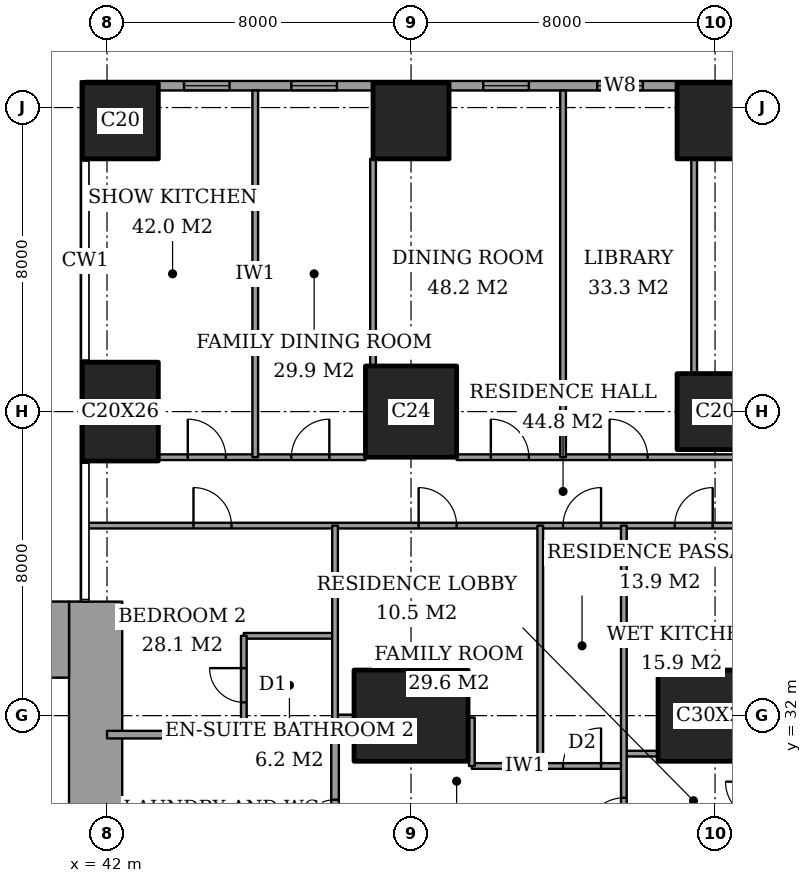
"""IFC4 building model, lengths in metres.
Left out: names, types, materials, properties, quantities, classifications, styles, units other than length and angle.
Written with IfcOpenShell. Run it as: python <this file> out.ifc"""

import sys

from ifc_helpers import new_model, si_unit, direction, frame, frame_2d, origin, origin_2d, place, context, subcontext, project, spatial, rectangle, extrude, element, fill, save


model = new_model("IFC4")
c1 = context("Model", 3, precision=1e-05, world=origin(), true_north=direction((0.0, 1.0)))
c2 = subcontext(c1, "Body", "Model", "MODEL_VIEW")
j1 = project(units=[si_unit("LENGTHUNIT", "METRE"), si_unit("PLANEANGLEUNIT", "RADIAN")], contexts=[c1])
p1 = place(None, origin())
s1 = spatial("IfcSite", under=j1, at=p1, CompositionType="ELEMENT")
p2 = place(p1, origin())
s2 = spatial("IfcBuilding", under=s1, at=p2, CompositionType="ELEMENT")
p3 = place(p2, frame((0.0, 0.0, 54.8)))
s3 = spatial("IfcBuildingStorey", under=s2, at=p3, CompositionType="ELEMENT", Elevation=54.8)
p4 = place(p3, frame((42.35, 40.0, 0.0), z_axis=(0.0, 0.0, 1.0), x_axis=(1.0, 0.0, 0.0)))
e1 = element("IfcColumn", 1, at=p4, inside=s3, PredefinedType="COLUMN", context=c2, shape_type="SweptSolid", body=[
    extrude(rectangle(XDim=2.0, YDim=2.6, at=origin_2d()), origin(), (0.0, 0.0, 1.0), 3.6),
])
p5 = place(p3, frame((42.35, 47.65, 0.0), z_axis=(0.0, 0.0, 1.0), x_axis=(1.0, 0.0, 0.0)))
e2 = element("IfcColumn", 2, at=p5, inside=s3, PredefinedType="COLUMN", context=c2, shape_type="SweptSolid", body=[
    extrude(rectangle(XDim=2.0, YDim=2.0, at=origin_2d()), origin(), (0.0, 0.0, 1.0), 3.6),
])
p6 = place(p3, frame((50.0, 32.0, 0.0), z_axis=(0.0, 0.0, 1.0), x_axis=(1.0, 0.0, 0.0)))
e3 = element("IfcColumn", 3, at=p6, inside=s3, PredefinedType="COLUMN", context=c2, shape_type="SweptSolid", body=[
    extrude(rectangle(XDim=3.0, YDim=2.4, at=origin_2d()), origin(), (0.0, 0.0, 1.0), 3.6),
])
p7 = place(p3, frame((50.0, 40.0, 0.0), z_axis=(0.0, 0.0, 1.0), x_axis=(1.0, 0.0, 0.0)))
e4 = element("IfcColumn", 4, at=p7, inside=s3, PredefinedType="COLUMN", context=c2, shape_type="SweptSolid", body=[
    extrude(rectangle(XDim=2.4, YDim=2.4, at=origin_2d()), origin(), (0.0, 0.0, 1.0), 3.6),
])
p8 = place(p3, frame((50.0, 47.65, 0.0), z_axis=(0.0, 0.0, 1.0), x_axis=(1.0, 0.0, 0.0)))
e5 = element("IfcColumn", 5, at=p8, inside=s3, PredefinedType="COLUMN", context=c2, shape_type="SweptSolid", body=[
    extrude(rectangle(XDim=2.0, YDim=2.0, at=origin_2d()), origin(), (0.0, 0.0, 1.0), 3.6),
])
p9 = place(p3, frame((58.0, 32.0, 0.0), z_axis=(0.0, 0.0, 1.0), x_axis=(1.0, 0.0, 0.0)))
e6 = element("IfcColumn", 6, at=p9, inside=s3, PredefinedType="COLUMN", context=c2, shape_type="SweptSolid", body=[
    extrude(rectangle(XDim=3.0, YDim=2.4, at=origin_2d()), origin(), (0.0, 0.0, 1.0), 3.6),
])
for number, where, z_axis, x_axis in (
    (7, (58.0, 40.0, 0.0), (0.0, 0.0, 1.0), (1.0, 0.0, 0.0)),
    (8, (58.0, 47.65, 0.0), (0.0, 0.0, 1.0), (1.0, 0.0, 0.0)),
):
    element("IfcColumn", number, at=place(p3, frame(where, z_axis=z_axis, x_axis=x_axis)), inside=s3, PredefinedType="COLUMN", context=c2, shape_type="SweptSolid", body=[
        extrude(rectangle(XDim=2.0, YDim=2.0, at=origin_2d()), origin(), (0.0, 0.0, 1.0), 3.6),
    ])
p10 = place(p3, frame((37.85, 34.0, 0.0), z_axis=(0.0, 0.0, 1.0), x_axis=(1.0, 0.0, 0.0)))
e9 = element("IfcWall", 9, at=p10, inside=s3, PredefinedType="SHEAR", context=c2, shape_type="SweptSolid", body=[
    extrude(rectangle(XDim=3.15, YDim=2.0, at=frame_2d((1.575, 0.0))), origin(), (0.0, 0.0, 1.0), 3.6),
])
p11 = place(p3, frame((41.7, 24.85, 0.0), z_axis=(0.0, 0.0, 1.0), x_axis=(0.0, 1.0, 0.0)))
e10 = element("IfcWall", 10, at=p11, inside=s3, PredefinedType="SHEAR", context=c2, shape_type="SweptSolid", body=[
    extrude(rectangle(XDim=10.15, YDim=1.4, at=frame_2d((5.075, 0.0))), origin(), (0.0, 0.0, 1.0), 3.6),
])
p12 = place(p3, frame((62.825, 48.575, 0.0), z_axis=(0.0, 0.0, 1.0), x_axis=(-1.0, 0.0, 0.0)))
e11 = element("IfcWall", 11, at=p12, inside=s3, PredefinedType="SOLIDWALL", context=c2, shape_type="SweptSolid", body=[
    extrude(rectangle(XDim=21.4, YDim=0.25, at=frame_2d((10.7, 0.0))), origin(), (0.0, 0.0, 1.0), 3.6),
])
p13 = place(p12, frame((0.775, 0.0, 0.6)))
e12 = element("IfcOpeningElement", 12, at=p13, cuts=e11, PredefinedType="OPENING", context=c2, shape_type="SweptSolid", body=[
    extrude(rectangle(XDim=2.4, YDim=2.0, at=frame_2d((1.2, 1.0))), frame((0.0, 0.135, 0.0), z_axis=(0.0, -1.0, 0.0), x_axis=(1.0, 0.0, 0.0)), (0.0, 0.0, 1.0), 0.27),
])
p14 = place(p12, frame((6.725, 0.0, 0.6)))
e13 = element("IfcOpeningElement", 13, at=p14, cuts=e11, PredefinedType="OPENING", context=c2, shape_type="SweptSolid", body=[
    extrude(rectangle(XDim=1.2, YDim=2.0, at=frame_2d((0.6, 1.0))), frame((0.0, 0.135, 0.0), z_axis=(0.0, -1.0, 0.0), x_axis=(1.0, 0.0, 0.0)), (0.0, 0.0, 1.0), 0.27),
])
p15 = place(p12, frame((9.725, 0.0, 0.6)))
e14 = element("IfcOpeningElement", 14, at=p15, cuts=e11, PredefinedType="OPENING", context=c2, shape_type="SweptSolid", body=[
    extrude(rectangle(XDim=1.2, YDim=2.0, at=frame_2d((0.6, 1.0))), frame((0.0, 0.135, 0.0), z_axis=(0.0, -1.0, 0.0), x_axis=(1.0, 0.0, 0.0)), (0.0, 0.0, 1.0), 0.27),
])
p16 = place(p12, frame((14.775, 0.0, 0.6)))
e15 = element("IfcOpeningElement", 15, at=p16, cuts=e11, PredefinedType="OPENING", context=c2, shape_type="SweptSolid", body=[
    extrude(rectangle(XDim=1.2, YDim=2.0, at=frame_2d((0.6, 1.0))), frame((0.0, 0.135, 0.0), z_axis=(0.0, -1.0, 0.0), x_axis=(1.0, 0.0, 0.0)), (0.0, 0.0, 1.0), 0.27),
])
p17 = place(p12, frame((17.6, 0.0, 0.6)))
e16 = element("IfcOpeningElement", 16, at=p17, cuts=e11, PredefinedType="OPENING", context=c2, shape_type="SweptSolid", body=[
    extrude(rectangle(XDim=1.2, YDim=2.0, at=frame_2d((0.6, 1.0))), frame((0.0, 0.135, 0.0), z_axis=(0.0, -1.0, 0.0), x_axis=(1.0, 0.0, 0.0)), (0.0, 0.0, 1.0), 0.27),
])
p18 = place(p3, frame((51.6, 30.675, 0.0), z_axis=(0.0, 0.0, 1.0), x_axis=(1.0, 0.0, 0.0)))
e17 = element("IfcWall", 17, at=p18, inside=s3, PredefinedType="PARTITIONING", context=c2, shape_type="SweptSolid", body=[
    extrude(rectangle(XDim=4.0, YDim=0.15, at=frame_2d((2.0, 0.0))), origin(), (0.0, 0.0, 1.0), 3.35),
])
p19 = place(p18, frame((2.4, 0.0, 0.0)))
e18 = element("IfcOpeningElement", 18, at=p19, cuts=e17, PredefinedType="OPENING", context=c2, shape_type="SweptSolid", body=[
    extrude(rectangle(XDim=1.0, YDim=2.1, at=frame_2d((0.5, 1.05))), frame((0.0, 0.085, 0.0), z_axis=(0.0, -1.0, 0.0), x_axis=(1.0, 0.0, 0.0)), (0.0, 0.0, 1.0), 0.17),
])
p20 = place(p3, frame((55.6, 31.0, 0.0), z_axis=(0.0, 0.0, 1.0), x_axis=(1.0, 0.0, 0.0)))
e19 = element("IfcWall", 19, at=p20, inside=s3, PredefinedType="PARTITIONING", context=c2, shape_type="SweptSolid", body=[
    extrude(rectangle(XDim=0.9, YDim=0.15, at=frame_2d((0.45, 0.0))), origin(), (0.0, 0.0, 1.0), 3.35),
])
p21 = place(p3, frame((42.0, 31.5, 0.0), z_axis=(0.0, 0.0, 1.0), x_axis=(1.0, 0.0, 0.0)))
e20 = element("IfcWall", 20, at=p21, inside=s3, PredefinedType="PARTITIONING", context=c2, shape_type="SweptSolid", body=[
    extrude(rectangle(XDim=6.0, YDim=0.2, at=frame_2d((3.0, 0.0))), origin(), (0.0, 0.0, 1.0), 3.35),
])
p22 = place(p3, frame((48.0, 31.95, 0.0), z_axis=(0.0, 0.0, 1.0), x_axis=(1.0, 0.0, 0.0)))
e21 = element("IfcWall", 21, at=p22, inside=s3, PredefinedType="PARTITIONING", context=c2, shape_type="SweptSolid", body=[
    extrude(rectangle(XDim=0.5, YDim=0.15, at=frame_2d((0.25, 0.0))), origin(), (0.0, 0.0, 1.0), 2.634),
])
p23 = place(p3, frame((45.6, 34.1, 0.0), z_axis=(0.0, 0.0, 1.0), x_axis=(1.0, 0.0, 0.0)))
e22 = element("IfcWall", 22, at=p23, inside=s3, PredefinedType="PARTITIONING", context=c2, shape_type="SweptSolid", body=[
    extrude(rectangle(XDim=2.4, YDim=0.15, at=frame_2d((1.2, 0.0))), origin(), (0.0, 0.0, 1.0), 3.35),
])
p24 = place(p3, frame((41.439, 37.0, 0.0), z_axis=(0.0, 0.0, 1.0), x_axis=(1.0, 0.0, 0.0)))
e23 = element("IfcWall", 23, at=p24, inside=s3, PredefinedType="PARTITIONING", context=c2, shape_type="SweptSolid", body=[
    extrude(rectangle(XDim=25.011, YDim=0.15, at=frame_2d((12.505, 0.0))), origin(), (0.0, 0.0, 1.0), 3.35),
])
p25 = place(p24, frame((12.561, 0.0, 0.0)))
e24 = element("IfcOpeningElement", 24, at=p25, cuts=e23, PredefinedType="OPENING", context=c2, shape_type="SweptSolid", body=[
    extrude(rectangle(XDim=1.0, YDim=2.1, at=frame_2d((0.5, 1.05))), frame((0.0, 0.085, 0.0), z_axis=(0.0, -1.0, 0.0), x_axis=(1.0, 0.0, 0.0)), (0.0, 0.0, 1.0), 0.17),
])
p26 = place(p24, frame((20.924, 0.0, 0.0)))
e25 = element("IfcOpeningElement", 25, at=p26, cuts=e23, PredefinedType="OPENING", context=c2, shape_type="SweptSolid", body=[
    extrude(rectangle(XDim=1.0, YDim=2.1, at=frame_2d((0.5, 1.05))), frame((0.0, 0.085, 0.0), z_axis=(0.0, -1.0, 0.0), x_axis=(1.0, 0.0, 0.0)), (0.0, 0.0, 1.0), 0.17),
])
p27 = place(p24, frame((15.499, 0.0, 0.0)))
e26 = element("IfcOpeningElement", 26, at=p27, cuts=e23, PredefinedType="OPENING", context=c2, shape_type="SweptSolid", body=[
    extrude(rectangle(XDim=1.0, YDim=2.1, at=frame_2d((0.5, 1.05))), frame((0.0, 0.085, 0.0), z_axis=(0.0, -1.0, 0.0), x_axis=(1.0, 0.0, 0.0)), (0.0, 0.0, 1.0), 0.17),
])
p28 = place(p24, frame((8.761, 0.0, 0.0)))
e27 = element("IfcOpeningElement", 27, at=p28, cuts=e23, PredefinedType="OPENING", context=c2, shape_type="SweptSolid", body=[
    extrude(rectangle(XDim=1.0, YDim=2.1, at=frame_2d((0.5, 1.05))), frame((0.0, 0.085, 0.0), z_axis=(0.0, -1.0, 0.0), x_axis=(1.0, 0.0, 0.0)), (0.0, 0.0, 1.0), 0.17),
])
p29 = place(p24, frame((2.836, 0.0, 0.0)))
e28 = element("IfcOpeningElement", 28, at=p29, cuts=e23, PredefinedType="OPENING", context=c2, shape_type="SweptSolid", body=[
    extrude(rectangle(XDim=1.0, YDim=2.1, at=frame_2d((0.5, 1.05))), frame((0.0, 0.085, 0.0), z_axis=(0.0, -1.0, 0.0), x_axis=(1.0, 0.0, 0.0)), (0.0, 0.0, 1.0), 0.17),
])
p30 = place(p3, frame((43.35, 38.8, 0.0), z_axis=(0.0, 0.0, 1.0), x_axis=(1.0, 0.0, 0.0)))
e29 = element("IfcWall", 29, at=p30, inside=s3, PredefinedType="PARTITIONING", context=c2, shape_type="SweptSolid", body=[
    extrude(rectangle(XDim=5.45, YDim=0.15, at=frame_2d((2.725, 0.0))), origin(), (0.0, 0.0, 1.0), 3.35),
])
p31 = place(p30, frame((3.5, 0.0, 0.0)))
e30 = element("IfcOpeningElement", 30, at=p31, cuts=e29, PredefinedType="OPENING", context=c2, shape_type="SweptSolid", body=[
    extrude(rectangle(XDim=1.0, YDim=2.1, at=frame_2d((0.5, 1.05))), frame((0.0, 0.085, 0.0), z_axis=(0.0, -1.0, 0.0), x_axis=(1.0, 0.0, 0.0)), (0.0, 0.0, 1.0), 0.17),
])
p32 = place(p30, frame((0.775, 0.0, 0.0)))
e31 = element("IfcOpeningElement", 31, at=p32, cuts=e29, PredefinedType="OPENING", context=c2, shape_type="SweptSolid", body=[
    extrude(rectangle(XDim=1.0, YDim=2.1, at=frame_2d((0.5, 1.05))), frame((0.0, 0.085, 0.0), z_axis=(0.0, -1.0, 0.0), x_axis=(1.0, 0.0, 0.0)), (0.0, 0.0, 1.0), 0.17),
])
p33 = place(p3, frame((51.2, 38.8, 0.0), z_axis=(0.0, 0.0, 1.0), x_axis=(1.0, 0.0, 0.0)))
e32 = element("IfcWall", 32, at=p33, inside=s3, PredefinedType="PARTITIONING", context=c2, shape_type="SweptSolid", body=[
    extrude(rectangle(XDim=15.25, YDim=0.15, at=frame_2d((7.625, 0.0))), origin(), (0.0, 0.0, 1.0), 3.35),
])
p34 = place(p33, frame((10.25, 0.0, 0.0)))
e33 = element("IfcOpeningElement", 33, at=p34, cuts=e32, PredefinedType="OPENING", context=c2, shape_type="SweptSolid", body=[
    extrude(rectangle(XDim=1.0, YDim=2.1, at=frame_2d((0.5, 1.05))), frame((0.0, 0.085, 0.0), z_axis=(0.0, -1.0, 0.0), x_axis=(1.0, 0.0, 0.0)), (0.0, 0.0, 1.0), 0.17),
])
p35 = place(p33, frame((4.025, 0.0, 0.0)))
e34 = element("IfcOpeningElement", 34, at=p35, cuts=e32, PredefinedType="OPENING", context=c2, shape_type="SweptSolid", body=[
    extrude(rectangle(XDim=1.0, YDim=2.1, at=frame_2d((0.5, 1.05))), frame((0.0, 0.085, 0.0), z_axis=(0.0, -1.0, 0.0), x_axis=(1.0, 0.0, 0.0)), (0.0, 0.0, 1.0), 0.17),
])
p36 = place(p33, frame((0.9, 0.0, 0.0)))
e35 = element("IfcOpeningElement", 35, at=p36, cuts=e32, PredefinedType="OPENING", context=c2, shape_type="SweptSolid", body=[
    extrude(rectangle(XDim=1.0, YDim=2.1, at=frame_2d((0.5, 1.05))), frame((0.0, 0.085, 0.0), z_axis=(0.0, -1.0, 0.0), x_axis=(1.0, 0.0, 0.0)), (0.0, 0.0, 1.0), 0.17),
])
p37 = place(p3, frame((45.6, 31.5, 0.0), z_axis=(0.0, 0.0, 1.0), x_axis=(0.0, 1.0, 0.0)))
e36 = element("IfcWall", 36, at=p37, inside=s3, PredefinedType="PARTITIONING", context=c2, shape_type="SweptSolid", body=[
    extrude(rectangle(XDim=2.6, YDim=0.15, at=frame_2d((1.3, 0.0))), origin(), (0.0, 0.0, 1.0), 3.35),
])
p38 = place(p37, frame((0.85, 0.0, 0.0)))
e37 = element("IfcOpeningElement", 37, at=p38, cuts=e36, PredefinedType="OPENING", context=c2, shape_type="SweptSolid", body=[
    extrude(rectangle(XDim=0.9, YDim=2.1, at=frame_2d((0.45, 1.05))), frame((0.0, 0.085, 0.0), z_axis=(0.0, -1.0, 0.0), x_axis=(1.0, 0.0, 0.0)), (0.0, 0.0, 1.0), 0.17),
])
p39 = place(p3, frame((45.9, 38.8, 0.0), z_axis=(0.0, 0.0, 1.0), x_axis=(0.0, 1.0, 0.0)))
e38 = element("IfcWall", 38, at=p39, inside=s3, PredefinedType="PARTITIONING", context=c2, shape_type="SweptSolid", body=[
    extrude(rectangle(XDim=9.65, YDim=0.15, at=frame_2d((4.825, 0.0))), origin(), (0.0, 0.0, 1.0), 3.35),
])
p40 = place(p3, frame((48.0, 28.0, 0.0), z_axis=(0.0, 0.0, 1.0), x_axis=(0.0, 1.0, 0.0)))
e39 = element("IfcWall", 39, at=p40, inside=s3, PredefinedType="PARTITIONING", context=c2, shape_type="SweptSolid", body=[
    extrude(rectangle(XDim=3.5, YDim=0.2, at=frame_2d((1.75, 0.0))), origin(), (0.0, 0.0, 1.0), 3.35),
])
p41 = place(p40, frame((0.887, 0.0, 0.0)))
e40 = element("IfcOpeningElement", 40, at=p41, cuts=e39, PredefinedType="OPENING", context=c2, shape_type="SweptSolid", body=[
    extrude(rectangle(XDim=0.9, YDim=2.1, at=frame_2d((0.45, 1.05))), frame((0.0, 0.11, 0.0), z_axis=(0.0, -1.0, 0.0), x_axis=(1.0, 0.0, 0.0)), (0.0, 0.0, 1.0), 0.22),
])
p42 = place(p3, frame((48.0, 31.5, 0.0), z_axis=(0.0, 0.0, 1.0), x_axis=(0.0, 1.0, 0.0)))
e41 = element("IfcWall", 41, at=p42, inside=s3, PredefinedType="PARTITIONING", context=c2, shape_type="SweptSolid", body=[
    extrude(rectangle(XDim=5.5, YDim=0.15, at=frame_2d((2.75, 0.0))), origin(), (0.0, 0.0, 1.0), 3.35),
])
p43 = place(p3, frame((49.0, 41.2, 0.0), z_axis=(0.0, 0.0, 1.0), x_axis=(0.0, 1.0, 0.0)))
e42 = element("IfcWall", 42, at=p43, inside=s3, PredefinedType="PARTITIONING", context=c2, shape_type="SweptSolid", body=[
    extrude(rectangle(XDim=5.45, YDim=0.15, at=frame_2d((2.725, 0.0))), origin(), (0.0, 0.0, 1.0), 3.35),
])
p44 = place(p3, frame((51.6, 30.675, 0.0), z_axis=(0.0, 0.0, 1.0), x_axis=(0.0, 1.0, 0.0)))
e43 = element("IfcWall", 43, at=p44, inside=s3, PredefinedType="PARTITIONING", context=c2, shape_type="SweptSolid", body=[
    extrude(rectangle(XDim=1.275, YDim=0.15, at=frame_2d((0.637, 0.0))), origin(), (0.0, 0.0, 1.0), 3.35),
])
p45 = place(p3, frame((53.4, 30.675, 0.0), z_axis=(0.0, 0.0, 1.0), x_axis=(0.0, 1.0, 0.0)))
e44 = element("IfcWall", 44, at=p45, inside=s3, PredefinedType="PARTITIONING", context=c2, shape_type="SweptSolid", body=[
    extrude(rectangle(XDim=6.325, YDim=0.15, at=frame_2d((3.163, 0.0))), origin(), (0.0, 0.0, 1.0), 3.35),
])
p46 = place(p3, frame((54.0, 38.8, 0.0), z_axis=(0.0, 0.0, 1.0), x_axis=(0.0, 1.0, 0.0)))
e45 = element("IfcWall", 45, at=p46, inside=s3, PredefinedType="PARTITIONING", context=c2, shape_type="SweptSolid", body=[
    extrude(rectangle(XDim=9.65, YDim=0.15, at=frame_2d((4.825, 0.0))), origin(), (0.0, 0.0, 1.0), 3.35),
])
p47 = place(p3, frame((55.6, 28.0, 0.0), z_axis=(0.0, 0.0, 1.0), x_axis=(0.0, 1.0, 0.0)))
e46 = element("IfcWall", 46, at=p47, inside=s3, PredefinedType="PARTITIONING", context=c2, shape_type="SweptSolid", body=[
    extrude(rectangle(XDim=9.0, YDim=0.15, at=frame_2d((4.5, 0.0))), origin(), (0.0, 0.0, 1.0), 3.35),
])
p48 = place(p47, frame((0.837, 0.0, 0.0)))
e47 = element("IfcOpeningElement", 47, at=p48, cuts=e46, PredefinedType="OPENING", context=c2, shape_type="SweptSolid", body=[
    extrude(rectangle(XDim=1.0, YDim=2.1, at=frame_2d((0.5, 1.05))), frame((0.0, 0.085, 0.0), z_axis=(0.0, -1.0, 0.0), x_axis=(1.0, 0.0, 0.0)), (0.0, 0.0, 1.0), 0.17),
])
p49 = place(p3, frame((57.45, 41.0, 0.0), z_axis=(0.0, 0.0, 1.0), x_axis=(0.0, 1.0, 0.0)))
e48 = element("IfcWall", 48, at=p49, inside=s3, PredefinedType="PARTITIONING", context=c2, shape_type="SweptSolid", body=[
    extrude(rectangle(XDim=5.65, YDim=0.15, at=frame_2d((2.825, 0.0))), origin(), (0.0, 0.0, 1.0), 3.35),
])
p50 = place(p14, origin())
e49 = element("IfcWindow", 49, at=p50, inside=s3, PartitioningType="SINGLE_PANEL", PredefinedType="WINDOW", context=c2, shape_type="SweptSolid", body=[
    extrude(rectangle(XDim=1.2, YDim=2.0, at=frame_2d((0.6, 1.0))), frame((0.0, 0.03, 0.0), z_axis=(0.0, -1.0, 0.0), x_axis=(1.0, 0.0, 0.0)), (0.0, 0.0, 1.0), 0.06),
])
fill(e13, e49)
p51 = place(p15, origin())
e50 = element("IfcWindow", 50, at=p51, inside=s3, PartitioningType="SINGLE_PANEL", PredefinedType="WINDOW", context=c2, shape_type="SweptSolid", body=[
    extrude(rectangle(XDim=1.2, YDim=2.0, at=frame_2d((0.6, 1.0))), frame((0.0, 0.03, 0.0), z_axis=(0.0, -1.0, 0.0), x_axis=(1.0, 0.0, 0.0)), (0.0, 0.0, 1.0), 0.06),
])
fill(e14, e50)
p52 = place(p16, origin())
e51 = element("IfcWindow", 51, at=p52, inside=s3, PartitioningType="SINGLE_PANEL", PredefinedType="WINDOW", context=c2, shape_type="SweptSolid", body=[
    extrude(rectangle(XDim=1.2, YDim=2.0, at=frame_2d((0.6, 1.0))), frame((0.0, 0.03, 0.0), z_axis=(0.0, -1.0, 0.0), x_axis=(1.0, 0.0, 0.0)), (0.0, 0.0, 1.0), 0.06),
])
fill(e15, e51)
p53 = place(p17, origin())
e52 = element("IfcWindow", 52, at=p53, inside=s3, PartitioningType="SINGLE_PANEL", PredefinedType="WINDOW", context=c2, shape_type="SweptSolid", body=[
    extrude(rectangle(XDim=1.2, YDim=2.0, at=frame_2d((0.6, 1.0))), frame((0.0, 0.03, 0.0), z_axis=(0.0, -1.0, 0.0), x_axis=(1.0, 0.0, 0.0)), (0.0, 0.0, 1.0), 0.06),
])
fill(e16, e52)
p54 = place(p35, origin())
e53 = element("IfcDoor", 53, at=p54, inside=s3, OperationType="SINGLE_SWING_RIGHT", PredefinedType="DOOR", context=c2, shape_type="SweptSolid", body=[
    extrude(rectangle(XDim=1.0, YDim=2.1, at=frame_2d((0.5, 1.05))), frame((0.0, 0.025, 0.0), z_axis=(0.0, -1.0, 0.0), x_axis=(1.0, 0.0, 0.0)), (0.0, 0.0, 1.0), 0.05),
])
fill(e34, e53)
p55 = place(p36, origin())
e54 = element("IfcDoor", 54, at=p55, inside=s3, OperationType="SINGLE_SWING_RIGHT", PredefinedType="DOOR", context=c2, shape_type="SweptSolid", body=[
    extrude(rectangle(XDim=1.0, YDim=2.1, at=frame_2d((0.5, 1.05))), frame((0.0, 0.025, 0.0), z_axis=(0.0, -1.0, 0.0), x_axis=(1.0, 0.0, 0.0)), (0.0, 0.0, 1.0), 0.05),
])
fill(e35, e54)
p56 = place(p31, origin())
e55 = element("IfcDoor", 55, at=p56, inside=s3, OperationType="SINGLE_SWING_LEFT", PredefinedType="DOOR", context=c2, shape_type="SweptSolid", body=[
    extrude(rectangle(XDim=1.0, YDim=2.1, at=frame_2d((0.5, 1.05))), frame((0.0, 0.025, 0.0), z_axis=(0.0, -1.0, 0.0), x_axis=(1.0, 0.0, 0.0)), (0.0, 0.0, 1.0), 0.05),
])
fill(e30, e55)
p57 = place(p32, origin())
e56 = element("IfcDoor", 56, at=p57, inside=s3, OperationType="SINGLE_SWING_RIGHT", PredefinedType="DOOR", context=c2, shape_type="SweptSolid", body=[
    extrude(rectangle(XDim=1.0, YDim=2.1, at=frame_2d((0.5, 1.05))), frame((0.0, 0.025, 0.0), z_axis=(0.0, -1.0, 0.0), x_axis=(1.0, 0.0, 0.0)), (0.0, 0.0, 1.0), 0.05),
])
fill(e31, e56)
p58 = place(p25, origin())
e57 = element("IfcDoor", 57, at=p58, inside=s3, OperationType="SINGLE_SWING_LEFT", PredefinedType="DOOR", context=c2, shape_type="SweptSolid", body=[
    extrude(rectangle(XDim=1.0, YDim=2.1, at=frame_2d((0.5, 1.05))), frame((0.0, 0.025, 0.0), z_axis=(0.0, -1.0, 0.0), x_axis=(1.0, 0.0, 0.0)), (0.0, 0.0, 1.0), 0.05),
])
fill(e24, e57)
p59 = place(p27, origin())
e58 = element("IfcDoor", 58, at=p59, inside=s3, OperationType="SINGLE_SWING_LEFT", PredefinedType="DOOR", context=c2, shape_type="SweptSolid", body=[
    extrude(rectangle(XDim=1.0, YDim=2.1, at=frame_2d((0.5, 1.05))), frame((0.0, 0.025, 0.0), z_axis=(0.0, -1.0, 0.0), x_axis=(1.0, 0.0, 0.0)), (0.0, 0.0, 1.0), 0.05),
])
fill(e26, e58)
p60 = place(p48, origin())
e59 = element("IfcDoor", 59, at=p60, inside=s3, OperationType="SINGLE_SWING_RIGHT", PredefinedType="DOOR", context=c2, shape_type="SweptSolid", body=[
    extrude(rectangle(XDim=1.0, YDim=2.1, at=frame_2d((0.5, 1.05))), frame((0.0, 0.025, 0.0), z_axis=(0.0, -1.0, 0.0), x_axis=(1.0, 0.0, 0.0)), (0.0, 0.0, 1.0), 0.05),
])
fill(e47, e59)
p61 = place(p19, origin())
e60 = element("IfcDoor", 60, at=p61, inside=s3, OperationType="SINGLE_SWING_LEFT", PredefinedType="DOOR", context=c2, shape_type="SweptSolid", body=[
    extrude(rectangle(XDim=1.0, YDim=2.1, at=frame_2d((0.5, 1.05))), frame((0.0, 0.025, 0.0), z_axis=(0.0, -1.0, 0.0), x_axis=(1.0, 0.0, 0.0)), (0.0, 0.0, 1.0), 0.05),
])
fill(e18, e60)
p62 = place(p28, origin())
e61 = element("IfcDoor", 61, at=p62, inside=s3, OperationType="SINGLE_SWING_RIGHT", PredefinedType="DOOR", context=c2, shape_type="SweptSolid", body=[
    extrude(rectangle(XDim=1.0, YDim=2.1, at=frame_2d((0.5, 1.05))), frame((0.0, 0.025, 0.0), z_axis=(0.0, -1.0, 0.0), x_axis=(1.0, 0.0, 0.0)), (0.0, 0.0, 1.0), 0.05),
])
fill(e27, e61)
p63 = place(p38, origin())
e62 = element("IfcDoor", 62, at=p63, inside=s3, OperationType="SINGLE_SWING_LEFT", PredefinedType="DOOR", context=c2, shape_type="SweptSolid", body=[
    extrude(rectangle(XDim=0.9, YDim=2.1, at=frame_2d((0.45, 1.05))), frame((0.0, 0.025, 0.0), z_axis=(0.0, -1.0, 0.0), x_axis=(1.0, 0.0, 0.0)), (0.0, 0.0, 1.0), 0.05),
])
fill(e37, e62)
p64 = place(p29, origin())
e63 = element("IfcDoor", 63, at=p64, inside=s3, OperationType="SINGLE_SWING_RIGHT", PredefinedType="DOOR", context=c2, shape_type="SweptSolid", body=[
    extrude(rectangle(XDim=1.0, YDim=2.1, at=frame_2d((0.5, 1.05))), frame((0.0, 0.025, 0.0), z_axis=(0.0, -1.0, 0.0), x_axis=(1.0, 0.0, 0.0)), (0.0, 0.0, 1.0), 0.05),
])
fill(e28, e63)
p65 = place(p41, origin())
e64 = element("IfcDoor", 64, at=p65, inside=s3, OperationType="SINGLE_SWING_RIGHT", PredefinedType="DOOR", context=c2, shape_type="SweptSolid", body=[
    extrude(rectangle(XDim=0.9, YDim=2.1, at=frame_2d((0.45, 1.05))), frame((0.0, 0.025, 0.0), z_axis=(0.0, -1.0, 0.0), x_axis=(1.0, 0.0, 0.0)), (0.0, 0.0, 1.0), 0.05),
])
fill(e40, e64)
save(model, sys.argv[1])
